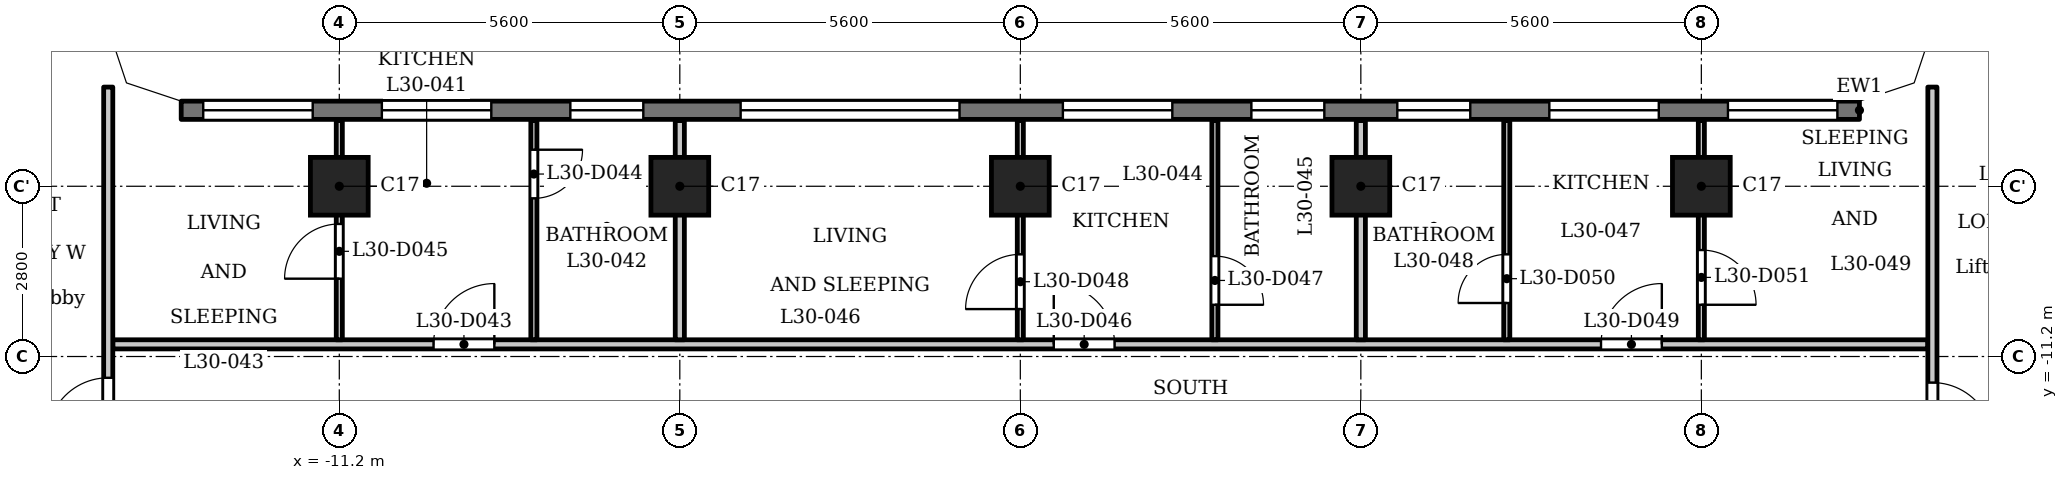
"""IFC4 building model, lengths in metres.
Left out: names, types, materials, properties, quantities, classifications, styles, units other than length and angle.
Written with IfcOpenShell. Run it as: python <this file> out.ifc"""

import sys

from ifc_helpers import new_model, si_unit, direction, frame, frame_2d, origin, origin_2d, place, context, subcontext, project, spatial, polyline, rectangle, outline, extrude, element, fill, save


model = new_model("IFC4")
c1 = context("Model", 3, precision=1e-05, world=origin(), true_north=direction((0.0, 1.0)))
c2 = subcontext(c1, "Body", "Model", "MODEL_VIEW")
j1 = project(units=[si_unit("LENGTHUNIT", "METRE"), si_unit("PLANEANGLEUNIT", "RADIAN")], contexts=[c1])
p1 = place(None, origin())
s1 = spatial("IfcSite", under=j1, at=p1, CompositionType="ELEMENT")
p2 = place(p1, origin())
s2 = spatial("IfcBuilding", under=s1, at=p2, CompositionType="ELEMENT")
p3 = place(p2, frame((0.0, 0.0, 118.3)))
s3 = spatial("IfcBuildingStorey", under=s2, at=p3, CompositionType="ELEMENT", Elevation=118.3)
for number, where, z_axis, x_axis in (
    (1, (-11.2, -8.4, 0.0), (0.0, 0.0, 1.0), (1.0, 0.0, 0.0)),
    (2, (-5.6, -8.4, 0.0), (0.0, 0.0, 1.0), (1.0, 0.0, 0.0)),
    (3, (0.0, -8.4, 0.0), (0.0, 0.0, 1.0), (1.0, 0.0, 0.0)),
    (4, (5.6, -8.4, 0.0), (0.0, 0.0, 1.0), (1.0, 0.0, 0.0)),
    (5, (11.2, -8.4, 0.0), (0.0, 0.0, 1.0), (1.0, 0.0, 0.0)),
):
    element("IfcColumn", number, at=place(p3, frame(where, z_axis=z_axis, x_axis=x_axis)), inside=s3, PredefinedType="COLUMN", context=c2, shape_type="SweptSolid", body=[
        extrude(rectangle(XDim=0.95, YDim=0.95, at=origin_2d()), origin(), (0.0, 0.0, 1.0), 3.5),
    ])
p4 = place(p3, frame((13.8, -7.15, 0.0), z_axis=(0.0, 0.0, 1.0), x_axis=(-1.0, 0.0, 0.0)))
e6 = element("IfcWall", 6, at=p4, inside=s3, PredefinedType="SOLIDWALL", context=c2, shape_type="SweptSolid", body=[
    extrude(rectangle(XDim=27.6, YDim=0.3, at=frame_2d((13.8, 0.0))), origin(), (0.0, 0.0, 1.0), 3.2),
])
p5 = place(p4, frame((0.363, 0.0, 0.9)))
e7 = element("IfcOpeningElement", 7, at=p5, cuts=e6, PredefinedType="OPENING", context=c2, shape_type="SweptSolid", body=[
    extrude(rectangle(XDim=1.8, YDim=1.25, at=frame_2d((0.9, 0.625))), frame((0.0, 0.16, 0.0), z_axis=(0.0, -1.0, 0.0), x_axis=(1.0, 0.0, 0.0)), (0.0, 0.0, 1.0), 0.32),
])
p6 = place(p4, frame((3.3, 0.0, 0.9)))
e8 = element("IfcOpeningElement", 8, at=p6, cuts=e6, PredefinedType="OPENING", context=c2, shape_type="SweptSolid", body=[
    extrude(rectangle(XDim=1.8, YDim=1.25, at=frame_2d((0.9, 0.625))), frame((0.0, 0.16, 0.0), z_axis=(0.0, -1.0, 0.0), x_axis=(1.0, 0.0, 0.0)), (0.0, 0.0, 1.0), 0.32),
])
p7 = place(p4, frame((6.4, 0.0, 0.6)))
e9 = element("IfcOpeningElement", 9, at=p7, cuts=e6, PredefinedType="OPENING", context=c2, shape_type="SweptSolid", body=[
    extrude(rectangle(XDim=1.2, YDim=1.55, at=frame_2d((0.6, 0.775))), frame((0.0, 0.16, 0.0), z_axis=(0.0, -1.0, 0.0), x_axis=(1.0, 0.0, 0.0)), (0.0, 0.0, 1.0), 0.32),
])
p8 = place(p4, frame((8.8, 0.0, 0.6)))
e10 = element("IfcOpeningElement", 10, at=p8, cuts=e6, PredefinedType="OPENING", context=c2, shape_type="SweptSolid", body=[
    extrude(rectangle(XDim=1.2, YDim=1.55, at=frame_2d((0.6, 0.775))), frame((0.0, 0.16, 0.0), z_axis=(0.0, -1.0, 0.0), x_axis=(1.0, 0.0, 0.0)), (0.0, 0.0, 1.0), 0.32),
])
p9 = place(p4, frame((11.3, 0.0, 0.9)))
e11 = element("IfcOpeningElement", 11, at=p9, cuts=e6, PredefinedType="OPENING", context=c2, shape_type="SweptSolid", body=[
    extrude(rectangle(XDim=1.8, YDim=1.25, at=frame_2d((0.9, 0.625))), frame((0.0, 0.16, 0.0), z_axis=(0.0, -1.0, 0.0), x_axis=(1.0, 0.0, 0.0)), (0.0, 0.0, 1.0), 0.32),
])
p10 = place(p4, frame((14.8, 0.0, 1.2)))
e12 = element("IfcOpeningElement", 12, at=p10, cuts=e6, PredefinedType="OPENING", context=c2, shape_type="SweptSolid", body=[
    extrude(rectangle(XDim=3.6, YDim=0.95, at=frame_2d((1.8, 0.475))), frame((0.0, 0.16, 0.0), z_axis=(0.0, -1.0, 0.0), x_axis=(1.0, 0.0, 0.0)), (0.0, 0.0, 1.0), 0.32),
])
p11 = place(p4, frame((20.0, 0.0, 0.6)))
e13 = element("IfcOpeningElement", 13, at=p11, cuts=e6, PredefinedType="OPENING", context=c2, shape_type="SweptSolid", body=[
    extrude(rectangle(XDim=1.2, YDim=1.55, at=frame_2d((0.6, 0.775))), frame((0.0, 0.16, 0.0), z_axis=(0.0, -1.0, 0.0), x_axis=(1.0, 0.0, 0.0)), (0.0, 0.0, 1.0), 0.32),
])
p12 = place(p4, frame((22.5, 0.0, 0.9)))
e14 = element("IfcOpeningElement", 14, at=p12, cuts=e6, PredefinedType="OPENING", context=c2, shape_type="SweptSolid", body=[
    extrude(rectangle(XDim=1.8, YDim=1.25, at=frame_2d((0.9, 0.625))), frame((0.0, 0.16, 0.0), z_axis=(0.0, -1.0, 0.0), x_axis=(1.0, 0.0, 0.0)), (0.0, 0.0, 1.0), 0.32),
])
p13 = place(p4, frame((25.438, 0.0, 0.9)))
e15 = element("IfcOpeningElement", 15, at=p13, cuts=e6, PredefinedType="OPENING", context=c2, shape_type="SweptSolid", body=[
    extrude(rectangle(XDim=1.8, YDim=1.25, at=frame_2d((0.9, 0.625))), frame((0.0, 0.16, 0.0), z_axis=(0.0, -1.0, 0.0), x_axis=(1.0, 0.0, 0.0)), (0.0, 0.0, 1.0), 0.32),
])
p14 = place(p3, frame((-14.925, -11.0, 0.0), z_axis=(0.0, 0.0, 1.0), x_axis=(1.0, 0.0, 0.0)))
e16 = element("IfcWall", 16, at=p14, inside=s3, PredefinedType="PARTITIONING", context=c2, shape_type="SweptSolid", body=[
    extrude(rectangle(XDim=29.85, YDim=0.15, at=frame_2d((14.925, 0.0))), origin(), (0.0, 0.0, 1.0), 3.2),
])
p15 = place(p14, frame((5.275, 0.0, 0.0)))
e17 = element("IfcOpeningElement", 17, at=p15, cuts=e16, PredefinedType="OPENING", context=c2, shape_type="SweptSolid", body=[
    extrude(rectangle(XDim=1.0, YDim=2.1, at=frame_2d((0.5, 1.05))), frame((0.0, 0.085, 0.0), z_axis=(0.0, -1.0, 0.0), x_axis=(1.0, 0.0, 0.0)), (0.0, 0.0, 1.0), 0.17),
])
p16 = place(p14, frame((15.475, 0.0, 0.0)))
e18 = element("IfcOpeningElement", 18, at=p16, cuts=e16, PredefinedType="OPENING", context=c2, shape_type="SweptSolid", body=[
    extrude(rectangle(XDim=1.0, YDim=2.1, at=frame_2d((0.5, 1.05))), frame((0.0, 0.085, 0.0), z_axis=(0.0, -1.0, 0.0), x_axis=(1.0, 0.0, 0.0)), (0.0, 0.0, 1.0), 0.17),
])
p17 = place(p14, frame((24.475, 0.0, 0.0)))
e19 = element("IfcOpeningElement", 19, at=p17, cuts=e16, PredefinedType="OPENING", context=c2, shape_type="SweptSolid", body=[
    extrude(rectangle(XDim=1.0, YDim=2.1, at=frame_2d((0.5, 1.05))), frame((0.0, 0.085, 0.0), z_axis=(0.0, -1.0, 0.0), x_axis=(1.0, 0.0, 0.0)), (0.0, 0.0, 1.0), 0.17),
])
p18 = place(p3, frame((-15.0, -13.125, 0.0), z_axis=(0.0, 0.0, 1.0), x_axis=(0.0, 1.0, 0.0)))
e20 = element("IfcWall", 20, at=p18, inside=s3, PredefinedType="PARTITIONING", context=c2, shape_type="SweptSolid", body=[
    extrude(rectangle(XDim=6.356, YDim=0.15, at=frame_2d((3.178, 0.0))), origin(), (0.0, 0.0, 1.0), 3.2),
])
p19 = place(p18, frame((0.575, 0.0, 0.0)))
e21 = element("IfcOpeningElement", 21, at=p19, cuts=e20, PredefinedType="OPENING", context=c2, shape_type="SweptSolid", body=[
    extrude(rectangle(XDim=1.0, YDim=2.1, at=frame_2d((0.5, 1.05))), frame((0.0, 0.085, 0.0), z_axis=(0.0, -1.0, 0.0), x_axis=(1.0, 0.0, 0.0)), (0.0, 0.0, 1.0), 0.17),
])
p20 = place(p3, frame((-11.2, -10.925, 0.0), z_axis=(0.0, 0.0, 1.0), x_axis=(0.0, 1.0, 0.0)))
e22 = element("IfcWall", 22, at=p20, inside=s3, PredefinedType="PARTITIONING", context=c2, shape_type="SweptSolid", body=[
    extrude(rectangle(XDim=3.605, YDim=0.1, at=frame_2d((1.802, 0.0))), origin(), (0.0, 0.0, 1.0), 3.2),
])
p21 = place(p20, frame((1.005, 0.0, 0.0)))
e23 = element("IfcOpeningElement", 23, at=p21, cuts=e22, PredefinedType="OPENING", context=c2, shape_type="SweptSolid", body=[
    extrude(rectangle(XDim=0.9, YDim=2.1, at=frame_2d((0.45, 1.05))), frame((0.0, 0.06, 0.0), z_axis=(0.0, -1.0, 0.0), x_axis=(1.0, 0.0, 0.0)), (0.0, 0.0, 1.0), 0.12),
])
p22 = place(p3, frame((-8.0, -10.925, 0.0), z_axis=(0.0, 0.0, 1.0), x_axis=(0.0, 1.0, 0.0)))
e24 = element("IfcWall", 24, at=p22, inside=s3, PredefinedType="PARTITIONING", context=c2, shape_type="SweptSolid", body=[
    extrude(rectangle(XDim=3.605, YDim=0.1, at=frame_2d((1.802, 0.0))), origin(), (0.0, 0.0, 1.0), 3.2),
])
p23 = place(p22, frame((2.326, 0.0, 0.0)))
e25 = element("IfcOpeningElement", 25, at=p23, cuts=e24, PredefinedType="OPENING", context=c2, shape_type="SweptSolid", body=[
    extrude(rectangle(XDim=0.8, YDim=2.1, at=frame_2d((0.4, 1.05))), frame((0.0, 0.06, 0.0), z_axis=(0.0, -1.0, 0.0), x_axis=(1.0, 0.0, 0.0)), (0.0, 0.0, 1.0), 0.12),
])
p24 = place(p3, frame((-5.6, -10.925, 0.0), z_axis=(0.0, 0.0, 1.0), x_axis=(0.0, 1.0, 0.0)))
e26 = element("IfcWall", 26, at=p24, inside=s3, PredefinedType="PARTITIONING", context=c2, shape_type="SweptSolid", body=[
    extrude(rectangle(XDim=3.605, YDim=0.15, at=frame_2d((1.802, 0.0))), origin(), (0.0, 0.0, 1.0), 3.2),
])
p25 = place(p3, frame((0.0, -10.925, 0.0), z_axis=(0.0, 0.0, 1.0), x_axis=(0.0, 1.0, 0.0)))
e27 = element("IfcWall", 27, at=p25, inside=s3, PredefinedType="PARTITIONING", context=c2, shape_type="SweptSolid", body=[
    extrude(rectangle(XDim=3.605, YDim=0.1, at=frame_2d((1.802, 0.0))), origin(), (0.0, 0.0, 1.0), 3.2),
])
p26 = place(p25, frame((0.505, 0.0, 0.0)))
e28 = element("IfcOpeningElement", 28, at=p26, cuts=e27, PredefinedType="OPENING", context=c2, shape_type="SweptSolid", body=[
    extrude(rectangle(XDim=0.9, YDim=2.1, at=frame_2d((0.45, 1.05))), frame((0.0, 0.06, 0.0), z_axis=(0.0, -1.0, 0.0), x_axis=(1.0, 0.0, 0.0)), (0.0, 0.0, 1.0), 0.12),
])
p27 = place(p3, frame((3.2, -10.925, 0.0), z_axis=(0.0, 0.0, 1.0), x_axis=(0.0, 1.0, 0.0)))
e29 = element("IfcWall", 29, at=p27, inside=s3, PredefinedType="PARTITIONING", context=c2, shape_type="SweptSolid", body=[
    extrude(rectangle(XDim=3.605, YDim=0.1, at=frame_2d((1.802, 0.0))), origin(), (0.0, 0.0, 1.0), 3.2),
])
p28 = place(p27, frame((0.576, 0.0, 0.0)))
e30 = element("IfcOpeningElement", 30, at=p28, cuts=e29, PredefinedType="OPENING", context=c2, shape_type="SweptSolid", body=[
    extrude(rectangle(XDim=0.8, YDim=2.1, at=frame_2d((0.4, 1.05))), frame((0.0, 0.06, 0.0), z_axis=(0.0, -1.0, 0.0), x_axis=(1.0, 0.0, 0.0)), (0.0, 0.0, 1.0), 0.12),
])
p29 = place(p3, frame((5.6, -10.925, 0.0), z_axis=(0.0, 0.0, 1.0), x_axis=(0.0, 1.0, 0.0)))
e31 = element("IfcWall", 31, at=p29, inside=s3, PredefinedType="PARTITIONING", context=c2, shape_type="SweptSolid", body=[
    extrude(rectangle(XDim=3.605, YDim=0.15, at=frame_2d((1.802, 0.0))), origin(), (0.0, 0.0, 1.0), 3.2),
])
p30 = place(p3, frame((8.0, -10.925, 0.0), z_axis=(0.0, 0.0, 1.0), x_axis=(0.0, 1.0, 0.0)))
e32 = element("IfcWall", 32, at=p30, inside=s3, PredefinedType="PARTITIONING", context=c2, shape_type="SweptSolid", body=[
    extrude(rectangle(XDim=3.605, YDim=0.1, at=frame_2d((1.802, 0.0))), origin(), (0.0, 0.0, 1.0), 3.2),
])
p31 = place(p30, frame((0.605, 0.0, 0.0)))
e33 = element("IfcOpeningElement", 33, at=p31, cuts=e32, PredefinedType="OPENING", context=c2, shape_type="SweptSolid", body=[
    extrude(rectangle(XDim=0.8, YDim=2.1, at=frame_2d((0.4, 1.05))), frame((0.0, 0.06, 0.0), z_axis=(0.0, -1.0, 0.0), x_axis=(1.0, 0.0, 0.0)), (0.0, 0.0, 1.0), 0.12),
])
p32 = place(p3, frame((11.2, -10.925, 0.0), z_axis=(0.0, 0.0, 1.0), x_axis=(0.0, 1.0, 0.0)))
e34 = element("IfcWall", 34, at=p32, inside=s3, PredefinedType="PARTITIONING", context=c2, shape_type="SweptSolid", body=[
    extrude(rectangle(XDim=3.605, YDim=0.1, at=frame_2d((1.802, 0.0))), origin(), (0.0, 0.0, 1.0), 3.2),
])
p33 = place(p32, frame((0.576, 0.0, 0.0)))
e35 = element("IfcOpeningElement", 35, at=p33, cuts=e34, PredefinedType="OPENING", context=c2, shape_type="SweptSolid", body=[
    extrude(rectangle(XDim=0.9, YDim=2.1, at=frame_2d((0.45, 1.05))), frame((0.0, 0.06, 0.0), z_axis=(0.0, -1.0, 0.0), x_axis=(1.0, 0.0, 0.0)), (0.0, 0.0, 1.0), 0.12),
])
p34 = place(p3, frame((15.0, -13.125, 0.0), z_axis=(0.0, 0.0, 1.0), x_axis=(0.0, 1.0, 0.0)))
e36 = element("IfcWall", 36, at=p34, inside=s3, PredefinedType="PARTITIONING", context=c2, shape_type="SweptSolid", body=[
    extrude(rectangle(XDim=6.356, YDim=0.15, at=frame_2d((3.178, 0.0))), origin(), (0.0, 0.0, 1.0), 3.2),
])
p35 = place(p34, frame((0.496, 0.0, 0.0)))
e37 = element("IfcOpeningElement", 37, at=p35, cuts=e36, PredefinedType="OPENING", context=c2, shape_type="SweptSolid", body=[
    extrude(rectangle(XDim=1.0, YDim=2.1, at=frame_2d((0.5, 1.05))), frame((0.0, 0.085, 0.0), z_axis=(0.0, -1.0, 0.0), x_axis=(1.0, 0.0, 0.0)), (0.0, 0.0, 1.0), 0.17),
])
p36 = place(p3, origin())
e38 = element("IfcWall", 38, at=p36, inside=s3, PredefinedType="SOLIDWALL", context=c2, shape_type="SweptSolid", body=[
    extrude(outline(polyline([(14.937, -6.937), (15.3, -5.849), (15.3, -5.8), (15.0, -5.8), (14.7, -6.7), (13.8, -7.0), (13.8, -7.3), (13.849, -7.3), (14.937, -6.937)])), origin(), (0.0, 0.0, 1.0), 3.2),
])
e39 = element("IfcWall", 39, at=p36, inside=s3, PredefinedType="SOLIDWALL", context=c2, shape_type="SweptSolid", body=[
    extrude(outline(polyline([(-14.937, -6.937), (-13.849, -7.3), (-13.8, -7.3), (-13.8, -7.0), (-14.7, -6.7), (-15.0, -5.8), (-15.3, -5.8), (-15.3, -5.849), (-14.937, -6.937)])), origin(), (0.0, 0.0, 1.0), 3.2),
])
p37 = place(p19, origin())
e40 = element("IfcDoor", 40, at=p37, inside=s3, OperationType="SINGLE_SWING_RIGHT", PredefinedType="DOOR", context=c2, shape_type="SweptSolid", body=[
    extrude(rectangle(XDim=1.0, YDim=2.1, at=frame_2d((0.5, 1.05))), frame((0.0, 0.025, 0.0), z_axis=(0.0, -1.0, 0.0), x_axis=(1.0, 0.0, 0.0)), (0.0, 0.0, 1.0), 0.05),
])
fill(e21, e40)
p38 = place(p35, origin())
e41 = element("IfcDoor", 41, at=p38, inside=s3, OperationType="SINGLE_SWING_LEFT", PredefinedType="DOOR", context=c2, shape_type="SweptSolid", body=[
    extrude(rectangle(XDim=1.0, YDim=2.1, at=frame_2d((0.5, 1.05))), frame((0.0, 0.025, 0.0), z_axis=(0.0, -1.0, 0.0), x_axis=(1.0, 0.0, 0.0)), (0.0, 0.0, 1.0), 0.05),
])
fill(e37, e41)
p39 = place(p15, origin())
e42 = element("IfcDoor", 42, at=p39, inside=s3, OperationType="SINGLE_SWING_LEFT", PredefinedType="DOOR", context=c2, shape_type="SweptSolid", body=[
    extrude(rectangle(XDim=1.0, YDim=2.1, at=frame_2d((0.5, 1.05))), frame((0.0, 0.025, 0.0), z_axis=(0.0, -1.0, 0.0), x_axis=(1.0, 0.0, 0.0)), (0.0, 0.0, 1.0), 0.05),
])
fill(e17, e42)
p40 = place(p23, origin())
e43 = element("IfcDoor", 43, at=p40, inside=s3, OperationType="SINGLE_SWING_RIGHT", PredefinedType="DOOR", context=c2, shape_type="SweptSolid", body=[
    extrude(rectangle(XDim=0.8, YDim=2.1, at=frame_2d((0.4, 1.05))), frame((0.0, 0.025, 0.0), z_axis=(0.0, -1.0, 0.0), x_axis=(1.0, 0.0, 0.0)), (0.0, 0.0, 1.0), 0.05),
])
fill(e25, e43)
p41 = place(p21, origin())
e44 = element("IfcDoor", 44, at=p41, inside=s3, OperationType="SINGLE_SWING_RIGHT", PredefinedType="DOOR", context=c2, shape_type="SweptSolid", body=[
    extrude(rectangle(XDim=0.9, YDim=2.1, at=frame_2d((0.45, 1.05))), frame((0.0, 0.025, 0.0), z_axis=(0.0, -1.0, 0.0), x_axis=(1.0, 0.0, 0.0)), (0.0, 0.0, 1.0), 0.05),
])
fill(e23, e44)
p42 = place(p16, origin())
e45 = element("IfcDoor", 45, at=p42, inside=s3, OperationType="SINGLE_SWING_RIGHT", PredefinedType="DOOR", context=c2, shape_type="SweptSolid", body=[
    extrude(rectangle(XDim=1.0, YDim=2.1, at=frame_2d((0.5, 1.05))), frame((0.0, 0.025, 0.0), z_axis=(0.0, -1.0, 0.0), x_axis=(1.0, 0.0, 0.0)), (0.0, 0.0, 1.0), 0.05),
])
fill(e18, e45)
p43 = place(p28, origin())
e46 = element("IfcDoor", 46, at=p43, inside=s3, OperationType="SINGLE_SWING_LEFT", PredefinedType="DOOR", context=c2, shape_type="SweptSolid", body=[
    extrude(rectangle(XDim=0.8, YDim=2.1, at=frame_2d((0.4, 1.05))), frame((0.0, 0.025, 0.0), z_axis=(0.0, -1.0, 0.0), x_axis=(1.0, 0.0, 0.0)), (0.0, 0.0, 1.0), 0.05),
])
fill(e30, e46)
p44 = place(p26, origin())
e47 = element("IfcDoor", 47, at=p44, inside=s3, OperationType="SINGLE_SWING_RIGHT", PredefinedType="DOOR", context=c2, shape_type="SweptSolid", body=[
    extrude(rectangle(XDim=0.9, YDim=2.1, at=frame_2d((0.45, 1.05))), frame((0.0, 0.025, 0.0), z_axis=(0.0, -1.0, 0.0), x_axis=(1.0, 0.0, 0.0)), (0.0, 0.0, 1.0), 0.05),
])
fill(e28, e47)
p45 = place(p17, origin())
e48 = element("IfcDoor", 48, at=p45, inside=s3, OperationType="SINGLE_SWING_LEFT", PredefinedType="DOOR", context=c2, shape_type="SweptSolid", body=[
    extrude(rectangle(XDim=1.0, YDim=2.1, at=frame_2d((0.5, 1.05))), frame((0.0, 0.025, 0.0), z_axis=(0.0, -1.0, 0.0), x_axis=(1.0, 0.0, 0.0)), (0.0, 0.0, 1.0), 0.05),
])
fill(e19, e48)
p46 = place(p31, origin())
e49 = element("IfcDoor", 49, at=p46, inside=s3, OperationType="SINGLE_SWING_RIGHT", PredefinedType="DOOR", context=c2, shape_type="SweptSolid", body=[
    extrude(rectangle(XDim=0.8, YDim=2.1, at=frame_2d((0.4, 1.05))), frame((0.0, 0.025, 0.0), z_axis=(0.0, -1.0, 0.0), x_axis=(1.0, 0.0, 0.0)), (0.0, 0.0, 1.0), 0.05),
])
fill(e33, e49)
p47 = place(p33, origin())
e50 = element("IfcDoor", 50, at=p47, inside=s3, OperationType="SINGLE_SWING_LEFT", PredefinedType="DOOR", context=c2, shape_type="SweptSolid", body=[
    extrude(rectangle(XDim=0.9, YDim=2.1, at=frame_2d((0.45, 1.05))), frame((0.0, 0.025, 0.0), z_axis=(0.0, -1.0, 0.0), x_axis=(1.0, 0.0, 0.0)), (0.0, 0.0, 1.0), 0.05),
])
fill(e35, e50)
p48 = place(p5, origin())
e51 = element("IfcWindow", 51, at=p48, inside=s3, PartitioningType="SINGLE_PANEL", PredefinedType="WINDOW", context=c2, shape_type="SweptSolid", body=[
    extrude(rectangle(XDim=1.8, YDim=1.25, at=frame_2d((0.9, 0.625))), frame((0.0, 0.03, 0.0), z_axis=(0.0, -1.0, 0.0), x_axis=(1.0, 0.0, 0.0)), (0.0, 0.0, 1.0), 0.06),
])
fill(e7, e51)
p49 = place(p6, origin())
e52 = element("IfcWindow", 52, at=p49, inside=s3, PartitioningType="SINGLE_PANEL", PredefinedType="WINDOW", context=c2, shape_type="SweptSolid", body=[
    extrude(rectangle(XDim=1.8, YDim=1.25, at=frame_2d((0.9, 0.625))), frame((0.0, 0.03, 0.0), z_axis=(0.0, -1.0, 0.0), x_axis=(1.0, 0.0, 0.0)), (0.0, 0.0, 1.0), 0.06),
])
fill(e8, e52)
p50 = place(p7, origin())
e53 = element("IfcWindow", 53, at=p50, inside=s3, PartitioningType="SINGLE_PANEL", PredefinedType="WINDOW", context=c2, shape_type="SweptSolid", body=[
    extrude(rectangle(XDim=1.2, YDim=1.55, at=frame_2d((0.6, 0.775))), frame((0.0, 0.03, 0.0), z_axis=(0.0, -1.0, 0.0), x_axis=(1.0, 0.0, 0.0)), (0.0, 0.0, 1.0), 0.06),
])
fill(e9, e53)
p51 = place(p8, origin())
e54 = element("IfcWindow", 54, at=p51, inside=s3, PartitioningType="SINGLE_PANEL", PredefinedType="WINDOW", context=c2, shape_type="SweptSolid", body=[
    extrude(rectangle(XDim=1.2, YDim=1.55, at=frame_2d((0.6, 0.775))), frame((0.0, 0.03, 0.0), z_axis=(0.0, -1.0, 0.0), x_axis=(1.0, 0.0, 0.0)), (0.0, 0.0, 1.0), 0.06),
])
fill(e10, e54)
p52 = place(p9, origin())
e55 = element("IfcWindow", 55, at=p52, inside=s3, PartitioningType="SINGLE_PANEL", PredefinedType="WINDOW", context=c2, shape_type="SweptSolid", body=[
    extrude(rectangle(XDim=1.8, YDim=1.25, at=frame_2d((0.9, 0.625))), frame((0.0, 0.03, 0.0), z_axis=(0.0, -1.0, 0.0), x_axis=(1.0, 0.0, 0.0)), (0.0, 0.0, 1.0), 0.06),
])
fill(e11, e55)
p53 = place(p10, origin())
e56 = element("IfcWindow", 56, at=p53, inside=s3, PartitioningType="SINGLE_PANEL", PredefinedType="WINDOW", context=c2, shape_type="SweptSolid", body=[
    extrude(rectangle(XDim=3.6, YDim=0.95, at=frame_2d((1.8, 0.475))), frame((0.0, 0.03, 0.0), z_axis=(0.0, -1.0, 0.0), x_axis=(1.0, 0.0, 0.0)), (0.0, 0.0, 1.0), 0.06),
])
fill(e12, e56)
p54 = place(p11, origin())
e57 = element("IfcWindow", 57, at=p54, inside=s3, PartitioningType="SINGLE_PANEL", PredefinedType="WINDOW", context=c2, shape_type="SweptSolid", body=[
    extrude(rectangle(XDim=1.2, YDim=1.55, at=frame_2d((0.6, 0.775))), frame((0.0, 0.03, 0.0), z_axis=(0.0, -1.0, 0.0), x_axis=(1.0, 0.0, 0.0)), (0.0, 0.0, 1.0), 0.06),
])
fill(e13, e57)
p55 = place(p12, origin())
e58 = element("IfcWindow", 58, at=p55, inside=s3, PartitioningType="SINGLE_PANEL", PredefinedType="WINDOW", context=c2, shape_type="SweptSolid", body=[
    extrude(rectangle(XDim=1.8, YDim=1.25, at=frame_2d((0.9, 0.625))), frame((0.0, 0.03, 0.0), z_axis=(0.0, -1.0, 0.0), x_axis=(1.0, 0.0, 0.0)), (0.0, 0.0, 1.0), 0.06),
])
fill(e14, e58)
p56 = place(p13, origin())
e59 = element("IfcWindow", 59, at=p56, inside=s3, PartitioningType="SINGLE_PANEL", PredefinedType="WINDOW", context=c2, shape_type="SweptSolid", body=[
    extrude(rectangle(XDim=1.8, YDim=1.25, at=frame_2d((0.9, 0.625))), frame((0.0, 0.03, 0.0), z_axis=(0.0, -1.0, 0.0), x_axis=(1.0, 0.0, 0.0)), (0.0, 0.0, 1.0), 0.06),
])
fill(e15, e59)
save(model, sys.argv[1])
